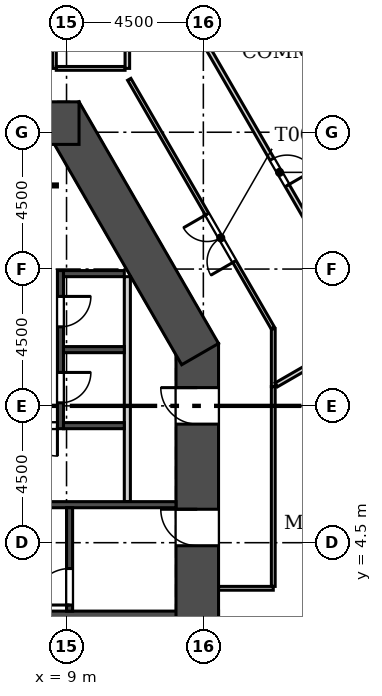
"""IFC4 building model, lengths in metres.
Left out: names, types, materials, properties, quantities, classifications, styles, units other than length and angle.
Written with IfcOpenShell. Run it as: python <this file> out.ifc"""

import sys

from ifc_helpers import new_model, si_unit, direction, frame, frame_2d, origin, place, context, subcontext, project, spatial, rectangle, extrude, element, fill, save


model = new_model("IFC4")
c1 = context("Model", 3, precision=1e-05, world=origin(), true_north=direction((0.0, 1.0)))
c2 = subcontext(c1, "Body", "Model", "MODEL_VIEW")
j1 = project(units=[si_unit("LENGTHUNIT", "METRE"), si_unit("PLANEANGLEUNIT", "RADIAN")], contexts=[c1])
p1 = place(None, origin())
s1 = spatial("IfcSite", under=j1, at=p1, CompositionType="ELEMENT")
p2 = place(p1, origin())
s2 = spatial("IfcBuilding", under=s1, at=p2, CompositionType="ELEMENT")
p3 = place(p2, frame((0.0, 0.0, 25.0)))
s3 = spatial("IfcBuildingStorey", under=s2, at=p3, CompositionType="ELEMENT", Elevation=25.0)
p4 = place(p3, frame((-14.0, 1.55, 0.0), z_axis=(0.0, 0.0, 1.0), x_axis=(1.0, 0.0, 0.0)))
e1 = element("IfcWall", 1, at=p4, inside=s3, PredefinedType="SHEAR", context=c2, shape_type="SweptSolid", body=[
    extrude(rectangle(XDim=28.0, YDim=1.4, at=frame_2d((14.0, 0.0))), origin(), (0.0, 0.0, 1.0), 4.5),
])
p5 = place(p3, frame((13.3, 0.85, 0.0), z_axis=(0.0, 0.0, 1.0), x_axis=(0.0, 1.0, 0.0)))
e2 = element("IfcWall", 2, at=p5, inside=s3, PredefinedType="SHEAR", context=c2, shape_type="SweptSolid", body=[
    extrude(rectangle(XDim=10.202, YDim=1.4, at=frame_2d((5.101, 0.0))), origin(), (0.0, 0.0, 1.0), 4.5),
])
p6 = place(p5, frame((3.55, 0.0, 0.0)))
e3 = element("IfcOpeningElement", 3, at=p6, cuts=e2, PredefinedType="OPENING", context=c2, shape_type="SweptSolid", body=[
    extrude(rectangle(XDim=1.2, YDim=2.1, at=frame_2d((0.6, 1.05))), frame((0.0, 0.71, 0.0), z_axis=(0.0, -1.0, 0.0), x_axis=(1.0, 0.0, 0.0)), (0.0, 0.0, 1.0), 1.42),
])
p7 = place(p5, frame((7.55, 0.0, 0.0)))
e4 = element("IfcOpeningElement", 4, at=p7, cuts=e2, PredefinedType="OPENING", context=c2, shape_type="SweptSolid", body=[
    extrude(rectangle(XDim=1.2, YDim=2.1, at=frame_2d((0.6, 1.05))), frame((0.0, 0.71, 0.0), z_axis=(0.0, -1.0, 0.0), x_axis=(1.0, 0.0, 0.0)), (0.0, 0.0, 1.0), 1.42),
])
p8 = place(p3, frame((13.394, 10.703, 0.0), z_axis=(0.0, 0.0, 1.0), x_axis=(-0.50000187635, 0.866024320471, 0.0)))
e5 = element("IfcWall", 5, at=p8, inside=s3, PredefinedType="SHEAR", context=c2, shape_type="SweptSolid", body=[
    extrude(rectangle(XDim=9.177, YDim=1.4, at=frame_2d((4.588, 0.0))), origin(), (0.0, 0.0, 1.0), 4.5),
])
p9 = place(p3, frame((9.412, 18.3, 0.0), z_axis=(0.0, 0.0, 1.0), x_axis=(-1.0, 0.0, 0.0)))
e6 = element("IfcWall", 6, at=p9, inside=s3, PredefinedType="SHEAR", context=c2, shape_type="SweptSolid", body=[
    extrude(rectangle(XDim=18.823, YDim=1.4, at=frame_2d((9.412, 0.0))), origin(), (0.0, 0.0, 1.0), 4.5),
])
p10 = place(p9, frame((8.711, 0.0, 0.0)))
e7 = element("IfcOpeningElement", 7, at=p10, cuts=e6, PredefinedType="OPENING", context=c2, shape_type="SweptSolid", body=[
    extrude(rectangle(XDim=1.4, YDim=2.1, at=frame_2d((0.7, 1.05))), frame((0.0, 0.71, 0.0), z_axis=(0.0, -1.0, 0.0), x_axis=(1.0, 0.0, 0.0)), (0.0, 0.0, 1.0), 1.42),
])
p11 = place(p9, frame((11.412, 0.0, 0.0)))
e8 = element("IfcOpeningElement", 8, at=p11, cuts=e6, PredefinedType="OPENING", context=c2, shape_type="SweptSolid", body=[
    extrude(rectangle(XDim=6.0, YDim=2.4, at=frame_2d((3.0, 1.2))), frame((0.0, 0.71, 0.0), z_axis=(0.0, -1.0, 0.0), x_axis=(1.0, 0.0, 0.0)), (0.0, 0.0, 1.0), 1.42),
])
p12 = place(p9, frame((1.412, 0.0, 0.0)))
e9 = element("IfcOpeningElement", 9, at=p12, cuts=e6, PredefinedType="OPENING", context=c2, shape_type="SweptSolid", body=[
    extrude(rectangle(XDim=6.0, YDim=2.4, at=frame_2d((3.0, 1.2))), frame((0.0, 0.71, 0.0), z_axis=(0.0, -1.0, 0.0), x_axis=(1.0, 0.0, 0.0)), (0.0, 0.0, 1.0), 1.42),
])
p13 = place(p3, frame((32.353, 7.709, 0.0), z_axis=(0.0, 0.0, 1.0), x_axis=(-0.500000836325, 0.866024920931, 0.0)))
e10 = element("IfcWall", 10, at=p13, inside=s3, PredefinedType="SOLIDWALL", context=c2, shape_type="SweptSolid", body=[
    extrude(rectangle(XDim=56.0, YDim=0.34, at=frame_2d((28.0, 0.0))), origin(), (0.0, 0.0, 1.0), 4.2),
])
p14 = place(p13, frame((1.5, 0.0, 0.9)))
e11 = element("IfcOpeningElement", 11, at=p14, cuts=e10, PredefinedType="OPENING", context=c2, shape_type="SweptSolid", body=[
    extrude(rectangle(XDim=1.885, YDim=3.0, at=frame_2d((0.942, 1.5))), frame((0.0, 0.18, 0.0), z_axis=(0.0, -1.0, 0.0), x_axis=(1.0, 0.0, 0.0)), (0.0, 0.0, 1.0), 0.36),
])
p15 = place(p13, frame((4.5, 0.0, 0.9)))
e12 = element("IfcOpeningElement", 12, at=p15, cuts=e10, PredefinedType="OPENING", context=c2, shape_type="SweptSolid", body=[
    extrude(rectangle(XDim=1.885, YDim=3.0, at=frame_2d((0.942, 1.5))), frame((0.0, 0.18, 0.0), z_axis=(0.0, -1.0, 0.0), x_axis=(1.0, 0.0, 0.0)), (0.0, 0.0, 1.0), 0.36),
])
p16 = place(p13, frame((7.5, 0.0, 0.9)))
e13 = element("IfcOpeningElement", 13, at=p16, cuts=e10, PredefinedType="OPENING", context=c2, shape_type="SweptSolid", body=[
    extrude(rectangle(XDim=1.885, YDim=3.0, at=frame_2d((0.942, 1.5))), frame((0.0, 0.18, 0.0), z_axis=(0.0, -1.0, 0.0), x_axis=(1.0, 0.0, 0.0)), (0.0, 0.0, 1.0), 0.36),
])
p17 = place(p13, frame((10.5, 0.0, 0.9)))
e14 = element("IfcOpeningElement", 14, at=p17, cuts=e10, PredefinedType="OPENING", context=c2, shape_type="SweptSolid", body=[
    extrude(rectangle(XDim=1.885, YDim=3.0, at=frame_2d((0.942, 1.5))), frame((0.0, 0.18, 0.0), z_axis=(0.0, -1.0, 0.0), x_axis=(1.0, 0.0, 0.0)), (0.0, 0.0, 1.0), 0.36),
])
p18 = place(p13, frame((13.5, 0.0, 0.9)))
e15 = element("IfcOpeningElement", 15, at=p18, cuts=e10, PredefinedType="OPENING", context=c2, shape_type="SweptSolid", body=[
    extrude(rectangle(XDim=1.885, YDim=3.0, at=frame_2d((0.942, 1.5))), frame((0.0, 0.18, 0.0), z_axis=(0.0, -1.0, 0.0), x_axis=(1.0, 0.0, 0.0)), (0.0, 0.0, 1.0), 0.36),
])
p19 = place(p13, frame((16.5, 0.0, 0.9)))
e16 = element("IfcOpeningElement", 16, at=p19, cuts=e10, PredefinedType="OPENING", context=c2, shape_type="SweptSolid", body=[
    extrude(rectangle(XDim=1.885, YDim=3.0, at=frame_2d((0.942, 1.5))), frame((0.0, 0.18, 0.0), z_axis=(0.0, -1.0, 0.0), x_axis=(1.0, 0.0, 0.0)), (0.0, 0.0, 1.0), 0.36),
])
p20 = place(p13, frame((19.5, 0.0, 0.9)))
e17 = element("IfcOpeningElement", 17, at=p20, cuts=e10, PredefinedType="OPENING", context=c2, shape_type="SweptSolid", body=[
    extrude(rectangle(XDim=1.885, YDim=3.0, at=frame_2d((0.942, 1.5))), frame((0.0, 0.18, 0.0), z_axis=(0.0, -1.0, 0.0), x_axis=(1.0, 0.0, 0.0)), (0.0, 0.0, 1.0), 0.36),
])
p21 = place(p13, frame((22.5, 0.0, 0.9)))
e18 = element("IfcOpeningElement", 18, at=p21, cuts=e10, PredefinedType="OPENING", context=c2, shape_type="SweptSolid", body=[
    extrude(rectangle(XDim=1.885, YDim=3.0, at=frame_2d((0.942, 1.5))), frame((0.0, 0.18, 0.0), z_axis=(0.0, -1.0, 0.0), x_axis=(1.0, 0.0, 0.0)), (0.0, 0.0, 1.0), 0.36),
])
p22 = place(p13, frame((25.5, 0.0, 0.9)))
e19 = element("IfcOpeningElement", 19, at=p22, cuts=e10, PredefinedType="OPENING", context=c2, shape_type="SweptSolid", body=[
    extrude(rectangle(XDim=1.885, YDim=3.0, at=frame_2d((0.942, 1.5))), frame((0.0, 0.18, 0.0), z_axis=(0.0, -1.0, 0.0), x_axis=(1.0, 0.0, 0.0)), (0.0, 0.0, 1.0), 0.36),
])
p23 = place(p13, frame((28.5, 0.0, 0.9)))
e20 = element("IfcOpeningElement", 20, at=p23, cuts=e10, PredefinedType="OPENING", context=c2, shape_type="SweptSolid", body=[
    extrude(rectangle(XDim=1.885, YDim=3.0, at=frame_2d((0.942, 1.5))), frame((0.0, 0.18, 0.0), z_axis=(0.0, -1.0, 0.0), x_axis=(1.0, 0.0, 0.0)), (0.0, 0.0, 1.0), 0.36),
])
p24 = place(p13, frame((31.5, 0.0, 0.0)))
e21 = element("IfcOpeningElement", 21, at=p24, cuts=e10, PredefinedType="OPENING", context=c2, shape_type="SweptSolid", body=[
    extrude(rectangle(XDim=1.885, YDim=2.6, at=frame_2d((0.942, 1.3))), frame((0.0, 0.18, 0.0), z_axis=(0.0, -1.0, 0.0), x_axis=(1.0, 0.0, 0.0)), (0.0, 0.0, 1.0), 0.36),
])
p25 = place(p13, frame((34.5, 0.0, 0.9)))
e22 = element("IfcOpeningElement", 22, at=p25, cuts=e10, PredefinedType="OPENING", context=c2, shape_type="SweptSolid", body=[
    extrude(rectangle(XDim=1.885, YDim=3.0, at=frame_2d((0.942, 1.5))), frame((0.0, 0.18, 0.0), z_axis=(0.0, -1.0, 0.0), x_axis=(1.0, 0.0, 0.0)), (0.0, 0.0, 1.0), 0.36),
])
p26 = place(p13, frame((37.5, 0.0, 0.9)))
e23 = element("IfcOpeningElement", 23, at=p26, cuts=e10, PredefinedType="OPENING", context=c2, shape_type="SweptSolid", body=[
    extrude(rectangle(XDim=1.885, YDim=3.0, at=frame_2d((0.942, 1.5))), frame((0.0, 0.18, 0.0), z_axis=(0.0, -1.0, 0.0), x_axis=(1.0, 0.0, 0.0)), (0.0, 0.0, 1.0), 0.36),
])
p27 = place(p13, frame((40.5, 0.0, 0.9)))
e24 = element("IfcOpeningElement", 24, at=p27, cuts=e10, PredefinedType="OPENING", context=c2, shape_type="SweptSolid", body=[
    extrude(rectangle(XDim=1.885, YDim=3.0, at=frame_2d((0.942, 1.5))), frame((0.0, 0.18, 0.0), z_axis=(0.0, -1.0, 0.0), x_axis=(1.0, 0.0, 0.0)), (0.0, 0.0, 1.0), 0.36),
])
p28 = place(p13, frame((43.5, 0.0, 0.9)))
e25 = element("IfcOpeningElement", 25, at=p28, cuts=e10, PredefinedType="OPENING", context=c2, shape_type="SweptSolid", body=[
    extrude(rectangle(XDim=1.885, YDim=3.0, at=frame_2d((0.942, 1.5))), frame((0.0, 0.18, 0.0), z_axis=(0.0, -1.0, 0.0), x_axis=(1.0, 0.0, 0.0)), (0.0, 0.0, 1.0), 0.36),
])
p29 = place(p13, frame((46.5, 0.0, 0.9)))
e26 = element("IfcOpeningElement", 26, at=p29, cuts=e10, PredefinedType="OPENING", context=c2, shape_type="SweptSolid", body=[
    extrude(rectangle(XDim=1.885, YDim=3.0, at=frame_2d((0.942, 1.5))), frame((0.0, 0.18, 0.0), z_axis=(0.0, -1.0, 0.0), x_axis=(1.0, 0.0, 0.0)), (0.0, 0.0, 1.0), 0.36),
])
p30 = place(p13, frame((49.5, 0.0, 0.9)))
e27 = element("IfcOpeningElement", 27, at=p30, cuts=e10, PredefinedType="OPENING", context=c2, shape_type="SweptSolid", body=[
    extrude(rectangle(XDim=1.885, YDim=3.0, at=frame_2d((0.942, 1.5))), frame((0.0, 0.18, 0.0), z_axis=(0.0, -1.0, 0.0), x_axis=(1.0, 0.0, 0.0)), (0.0, 0.0, 1.0), 0.36),
])
p31 = place(p13, frame((52.5, 0.0, 0.9)))
e28 = element("IfcOpeningElement", 28, at=p31, cuts=e10, PredefinedType="OPENING", context=c2, shape_type="SweptSolid", body=[
    extrude(rectangle(XDim=1.885, YDim=3.0, at=frame_2d((0.942, 1.5))), frame((0.0, 0.18, 0.0), z_axis=(0.0, -1.0, 0.0), x_axis=(1.0, 0.0, 0.0)), (0.0, 0.0, 1.0), 0.36),
])
p32 = place(p3, frame((11.0, 5.85, 0.0), z_axis=(0.0, 0.0, 1.0), x_axis=(0.0, 1.0, 0.0)))
e29 = element("IfcWall", 29, at=p32, inside=s3, PredefinedType="SOLIDWALL", context=c2, shape_type="SweptSolid", body=[
    extrude(rectangle(XDim=7.4, YDim=0.2, at=frame_2d((3.7, 0.0))), origin(), (0.0, 0.0, 1.0), 4.2),
])
p33 = place(p3, frame((8.8, 8.25, -2.0), z_axis=(0.0, 0.0, 1.0), x_axis=(0.0, 1.0, 0.0)))
e30 = element("IfcWall", 30, at=p33, inside=s3, PredefinedType="SOLIDWALL", context=c2, shape_type="SweptSolid", body=[
    extrude(rectangle(XDim=5.2, YDim=0.2, at=frame_2d((2.6, 0.0))), origin(), (0.0, 0.0, 1.0), 6.2),
])
p34 = place(p33, frame((0.85, 0.0, 2.0)))
e31 = element("IfcOpeningElement", 31, at=p34, cuts=e30, PredefinedType="OPENING", context=c2, shape_type="SweptSolid", body=[
    extrude(rectangle(XDim=1.0, YDim=2.1, at=frame_2d((0.5, 1.05))), frame((0.0, 0.11, 0.0), z_axis=(0.0, -1.0, 0.0), x_axis=(1.0, 0.0, 0.0)), (0.0, 0.0, 1.0), 0.22),
])
p35 = place(p33, frame((3.35, 0.0, 2.0)))
e32 = element("IfcOpeningElement", 32, at=p35, cuts=e30, PredefinedType="OPENING", context=c2, shape_type="SweptSolid", body=[
    extrude(rectangle(XDim=1.0, YDim=2.1, at=frame_2d((0.5, 1.05))), frame((0.0, 0.11, 0.0), z_axis=(0.0, -1.0, 0.0), x_axis=(1.0, 0.0, 0.0)), (0.0, 0.0, 1.0), 0.22),
])
p36 = place(p3, frame((8.9, 8.35, -2.0), z_axis=(0.0, 0.0, 1.0), x_axis=(1.0, 0.0, 0.0)))
e33 = element("IfcWall", 33, at=p36, inside=s3, PredefinedType="SOLIDWALL", context=c2, shape_type="SweptSolid", body=[
    extrude(rectangle(XDim=2.0, YDim=0.2, at=frame_2d((1.0, 0.0))), origin(), (0.0, 0.0, 1.0), 6.2),
])
p37 = place(p3, frame((1.2, 5.75, -2.0), z_axis=(0.0, 0.0, 1.0), x_axis=(1.0, 0.0, 0.0)))
e34 = element("IfcWall", 34, at=p37, inside=s3, PredefinedType="SOLIDWALL", context=c2, shape_type="SweptSolid", body=[
    extrude(rectangle(XDim=11.4, YDim=0.2, at=frame_2d((5.7, 0.0))), origin(), (0.0, 0.0, 1.0), 6.2),
])
p38 = place(p3, frame((9.1, 2.25, -2.0), z_axis=(0.0, 0.0, 1.0), x_axis=(0.0, 1.0, 0.0)))
e35 = element("IfcWall", 35, at=p38, inside=s3, PredefinedType="SOLIDWALL", context=c2, shape_type="SweptSolid", body=[
    extrude(rectangle(XDim=3.4, YDim=0.2, at=frame_2d((1.7, 0.0))), origin(), (0.0, 0.0, 1.0), 6.2),
])
p39 = place(p38, frame((0.2, 0.0, 2.0)))
e36 = element("IfcOpeningElement", 36, at=p39, cuts=e35, PredefinedType="OPENING", context=c2, shape_type="SweptSolid", body=[
    extrude(rectangle(XDim=1.2, YDim=2.1, at=frame_2d((0.6, 1.05))), frame((0.0, 0.11, 0.0), z_axis=(0.0, -1.0, 0.0), x_axis=(1.0, 0.0, 0.0)), (0.0, 0.0, 1.0), 0.22),
])
for number, where, z_axis, x_axis in (
    (37, (8.9, 10.85, -2.0), (0.0, 0.0, 1.0), (1.0, 0.0, 0.0)),
    (38, (8.9, 13.35, -2.0), (0.0, 0.0, 1.0), (1.0, 0.0, 0.0)),
):
    element("IfcWall", number, at=place(p3, frame(where, z_axis=z_axis, x_axis=x_axis)), inside=s3, PredefinedType="SOLIDWALL", context=c2, shape_type="SweptSolid", body=[
        extrude(rectangle(XDim=2.0, YDim=0.2, at=frame_2d((1.0, 0.0))), origin(), (0.0, 0.0, 1.0), 6.2),
    ])
p40 = place(p3, frame((5.9, 16.25, 0.0), z_axis=(0.0, 0.0, 1.0), x_axis=(1.0, 0.0, 0.0)))
e39 = element("IfcWall", 39, at=p40, inside=s3, PredefinedType="PARTITIONING", context=c2, shape_type="SweptSolid", body=[
    extrude(rectangle(XDim=2.8, YDim=0.1, at=frame_2d((1.4, 0.0))), origin(), (0.0, 0.0, 1.0), 4.2),
])
p41 = place(p40, frame((0.7, 0.0, 0.0)))
e40 = element("IfcOpeningElement", 40, at=p41, cuts=e39, PredefinedType="OPENING", context=c2, shape_type="SweptSolid", body=[
    extrude(rectangle(XDim=1.4, YDim=2.1, at=frame_2d((0.7, 1.05))), frame((0.0, 0.06, 0.0), z_axis=(0.0, -1.0, 0.0), x_axis=(1.0, 0.0, 0.0)), (0.0, 0.0, 1.0), 0.12),
])
p42 = place(p3, frame((5.9, 8.35, 0.0), z_axis=(0.0, 0.0, 1.0), x_axis=(1.0, 0.0, 0.0)))
e41 = element("IfcWall", 41, at=p42, inside=s3, PredefinedType="SOLIDWALL", context=c2, shape_type="SweptSolid", body=[
    extrude(rectangle(XDim=2.8, YDim=0.2, at=frame_2d((1.4, 0.0))), origin(), (0.0, 0.0, 1.0), 4.2),
])
p43 = place(p42, frame((1.8, 0.0, 0.0)))
e42 = element("IfcOpeningElement", 42, at=p43, cuts=e41, PredefinedType="OPENING", context=c2, shape_type="SweptSolid", body=[
    extrude(rectangle(XDim=1.0, YDim=2.1, at=frame_2d((0.5, 1.05))), frame((0.0, 0.11, 0.0), z_axis=(0.0, -1.0, 0.0), x_axis=(1.0, 0.0, 0.0)), (0.0, 0.0, 1.0), 0.22),
])
p44 = place(p3, frame((11.062, 19.74, 0.0), z_axis=(0.0, 0.0, 1.0), x_axis=(0.499995462694, -0.866028023383, 0.0)))
e43 = element("IfcWall", 43, at=p44, inside=s3, PredefinedType="PARTITIONING", context=c2, shape_type="SweptSolid", body=[
    extrude(rectangle(XDim=9.444, YDim=0.125, at=frame_2d((4.722, 0.0))), origin(), (0.0, 0.0, 1.0), 4.2),
])
p45 = place(p44, frame((5.121, 0.0, 0.0)))
e44 = element("IfcOpeningElement", 44, at=p45, cuts=e43, PredefinedType="OPENING", context=c2, shape_type="SweptSolid", body=[
    extrude(rectangle(XDim=1.8, YDim=2.1, at=frame_2d((0.9, 1.05))), frame((0.0, 0.073, 0.0), z_axis=(0.0, -1.0, 0.0), x_axis=(1.0, 0.0, 0.0)), (0.0, 0.0, 1.0), 0.145),
])
p46 = place(p3, frame((15.8, 11.535, 0.0), z_axis=(0.0, 0.0, 1.0), x_axis=(0.0, -1.0, 0.0)))
e45 = element("IfcWall", 45, at=p46, inside=s3, PredefinedType="PARTITIONING", context=c2, shape_type="SweptSolid", body=[
    extrude(rectangle(XDim=1.902, YDim=0.125, at=frame_2d((0.951, 0.0))), origin(), (0.0, 0.0, 1.0), 4.2),
])
p47 = place(p3, frame((15.8, 9.633, 0.0), z_axis=(0.0, 0.0, 1.0), x_axis=(0.0, -1.0, 0.0)))
e46 = element("IfcWall", 46, at=p47, inside=s3, PredefinedType="PARTITIONING", context=c2, shape_type="SweptSolid", body=[
    extrude(rectangle(XDim=6.571, YDim=0.125, at=frame_2d((3.285, 0.0))), origin(), (0.0, 0.0, 1.0), 4.2),
])
p48 = place(p3, frame((15.8, 3.0, 0.0), z_axis=(0.0, 0.0, 1.0), x_axis=(-1.0, 0.0, 0.0)))
e47 = element("IfcWall", 47, at=p48, inside=s3, PredefinedType="PARTITIONING", context=c2, shape_type="SweptSolid", body=[
    extrude(rectangle(XDim=1.8, YDim=0.125, at=frame_2d((0.9, 0.0))), origin(), (0.0, 0.0, 1.0), 4.2),
])
p49 = place(p3, frame((8.6, 22.324, 0.0), z_axis=(0.0, 0.0, 1.0), x_axis=(0.0, -1.0, 0.0)))
e48 = element("IfcWall", 48, at=p49, inside=s3, PredefinedType="PARTITIONING", context=c2, shape_type="SweptSolid", body=[
    extrude(rectangle(XDim=2.224, YDim=0.125, at=frame_2d((1.112, 0.0))), origin(), (0.0, 0.0, 1.0), 4.2),
])
p50 = place(p49, frame((0.612, 0.0, 0.0)))
e49 = element("IfcOpeningElement", 49, at=p50, cuts=e48, PredefinedType="OPENING", context=c2, shape_type="SweptSolid", body=[
    extrude(rectangle(XDim=1.0, YDim=2.1, at=frame_2d((0.5, 1.05))), frame((0.0, 0.073, 0.0), z_axis=(0.0, -1.0, 0.0), x_axis=(1.0, 0.0, 0.0)), (0.0, 0.0, 1.0), 0.145),
])
p51 = place(p3, frame((8.663, 20.1, 0.0), z_axis=(0.0, 0.0, 1.0), x_axis=(1.0, 0.0, 0.0)))
e50 = element("IfcWall", 50, at=p51, inside=s3, PredefinedType="PARTITIONING", context=c2, shape_type="SweptSolid", body=[
    extrude(rectangle(XDim=2.262, YDim=0.125, at=frame_2d((1.131, 0.0))), origin(), (0.0, 0.0, 1.0), 4.2),
])
p52 = place(p3, frame((19.007, 11.485, 0.0), z_axis=(0.0, 0.0, 1.0), x_axis=(-0.866048453834, -0.499960074017, 0.0)))
e51 = element("IfcWall", 51, at=p52, inside=s3, PredefinedType="PARTITIONING", context=c2, shape_type="SweptSolid", body=[
    extrude(rectangle(XDim=3.587, YDim=0.15, at=frame_2d((1.793, 0.0))), origin(), (0.0, 0.0, 1.0), 4.2),
])
p53 = place(p52, frame((1.294, 0.0, 0.0)))
e52 = element("IfcOpeningElement", 52, at=p53, cuts=e51, PredefinedType="OPENING", context=c2, shape_type="SweptSolid", body=[
    extrude(rectangle(XDim=1.0, YDim=2.1, at=frame_2d((0.5, 1.05))), frame((0.0, 0.085, 0.0), z_axis=(0.0, -1.0, 0.0), x_axis=(1.0, 0.0, 0.0)), (0.0, 0.0, 1.0), 0.17),
])
p54 = place(p3, frame((13.045, 21.812, 0.0), z_axis=(0.0, 0.0, 1.0), x_axis=(0.499994727438, -0.866028447878, 0.0)))
e53 = element("IfcWall", 53, at=p54, inside=s3, PredefinedType="PARTITIONING", context=c2, shape_type="SweptSolid", body=[
    extrude(rectangle(XDim=11.85, YDim=0.15, at=frame_2d((5.925, 0.0))), origin(), (0.0, 0.0, 1.0), 4.2),
])
p55 = place(p54, frame((5.425, 0.0, 0.0)))
e54 = element("IfcOpeningElement", 54, at=p55, cuts=e53, PredefinedType="OPENING", context=c2, shape_type="SweptSolid", body=[
    extrude(rectangle(XDim=1.0, YDim=2.1, at=frame_2d((0.5, 1.05))), frame((0.0, 0.085, 0.0), z_axis=(0.0, -1.0, 0.0), x_axis=(1.0, 0.0, 0.0)), (0.0, 0.0, 1.0), 0.17),
])
p56 = place(p3, frame((11.0, 20.1, 0.0), z_axis=(0.0, 0.0, 1.0), x_axis=(0.0, 1.0, 0.0)))
e55 = element("IfcWall", 55, at=p56, inside=s3, PredefinedType="PARTITIONING", context=c2, shape_type="SweptSolid", body=[
    extrude(rectangle(XDim=2.3, YDim=0.15, at=frame_2d((1.15, 0.0))), origin(), (0.0, 0.0, 1.0), 4.2),
])
p57 = place(p34, frame((1.0, 0.0, 0.0), z_axis=(0.0, 0.0, 1.0), x_axis=(-1.0, 0.0, 0.0)))
e56 = element("IfcDoor", 56, at=p57, inside=s3, OperationType="SINGLE_SWING_LEFT", PredefinedType="DOOR", context=c2, shape_type="SweptSolid", body=[
    extrude(rectangle(XDim=1.0, YDim=2.1, at=frame_2d((0.5, 1.05))), frame((0.0, 0.025, 0.0), z_axis=(0.0, -1.0, 0.0), x_axis=(1.0, 0.0, 0.0)), (0.0, 0.0, 1.0), 0.05),
])
fill(e31, e56)
p58 = place(p35, frame((1.0, 0.0, 0.0), z_axis=(0.0, 0.0, 1.0), x_axis=(-1.0, 0.0, 0.0)))
e57 = element("IfcDoor", 57, at=p58, inside=s3, OperationType="SINGLE_SWING_LEFT", PredefinedType="DOOR", context=c2, shape_type="SweptSolid", body=[
    extrude(rectangle(XDim=1.0, YDim=2.1, at=frame_2d((0.5, 1.05))), frame((0.0, 0.025, 0.0), z_axis=(0.0, -1.0, 0.0), x_axis=(1.0, 0.0, 0.0)), (0.0, 0.0, 1.0), 0.05),
])
fill(e32, e57)
p59 = place(p43, frame((1.0, 0.0, 0.0), z_axis=(0.0, 0.0, 1.0), x_axis=(-1.0, 0.0, 0.0)))
e58 = element("IfcDoor", 58, at=p59, inside=s3, OperationType="SINGLE_SWING_LEFT", PredefinedType="DOOR", context=c2, shape_type="SweptSolid", body=[
    extrude(rectangle(XDim=1.0, YDim=2.1, at=frame_2d((0.5, 1.05))), frame((0.0, 0.025, 0.0), z_axis=(0.0, -1.0, 0.0), x_axis=(1.0, 0.0, 0.0)), (0.0, 0.0, 1.0), 0.05),
])
fill(e42, e58)
p60 = place(p6, origin())
e59 = element("IfcDoor", 59, at=p60, inside=s3, OperationType="SINGLE_SWING_RIGHT", PredefinedType="DOOR", context=c2, shape_type="SweptSolid", body=[
    extrude(rectangle(XDim=1.2, YDim=2.1, at=frame_2d((0.6, 1.05))), frame((0.0, 0.025, 0.0), z_axis=(0.0, -1.0, 0.0), x_axis=(1.0, 0.0, 0.0)), (0.0, 0.0, 1.0), 0.05),
])
fill(e3, e59)
p61 = place(p39, origin())
e60 = element("IfcDoor", 60, at=p61, inside=s3, OperationType="SINGLE_SWING_LEFT", PredefinedType="DOOR", context=c2, shape_type="SweptSolid", body=[
    extrude(rectangle(XDim=1.2, YDim=2.1, at=frame_2d((0.6, 1.05))), frame((0.0, 0.025, 0.0), z_axis=(0.0, -1.0, 0.0), x_axis=(1.0, 0.0, 0.0)), (0.0, 0.0, 1.0), 0.05),
])
fill(e36, e60)
p62 = place(p7, origin())
e61 = element("IfcDoor", 61, at=p62, inside=s3, OperationType="SINGLE_SWING_RIGHT", PredefinedType="DOOR", context=c2, shape_type="SweptSolid", body=[
    extrude(rectangle(XDim=1.2, YDim=2.1, at=frame_2d((0.6, 1.05))), frame((0.0, 0.025, 0.0), z_axis=(0.0, -1.0, 0.0), x_axis=(1.0, 0.0, 0.0)), (0.0, 0.0, 1.0), 0.05),
])
fill(e4, e61)
p63 = place(p45, frame((1.8, 0.0, 0.0), z_axis=(0.0, 0.0, 1.0), x_axis=(-1.0, 0.0, 0.0)))
e62 = element("IfcDoor", 62, at=p63, inside=s3, OperationType="DOUBLE_DOOR_SINGLE_SWING", PredefinedType="DOOR", context=c2, shape_type="SweptSolid", body=[
    extrude(rectangle(XDim=1.8, YDim=2.1, at=frame_2d((0.9, 1.05))), frame((0.0, 0.025, 0.0), z_axis=(0.0, -1.0, 0.0), x_axis=(1.0, 0.0, 0.0)), (0.0, 0.0, 1.0), 0.05),
])
fill(e44, e62)
p64 = place(p55, origin())
e63 = element("IfcDoor", 63, at=p64, inside=s3, OperationType="SINGLE_SWING_RIGHT", PredefinedType="DOOR", context=c2, shape_type="SweptSolid", body=[
    extrude(rectangle(XDim=1.0, YDim=2.1, at=frame_2d((0.5, 1.05))), frame((0.0, 0.025, 0.0), z_axis=(0.0, -1.0, 0.0), x_axis=(1.0, 0.0, 0.0)), (0.0, 0.0, 1.0), 0.05),
])
fill(e54, e63)
save(model, sys.argv[1])
